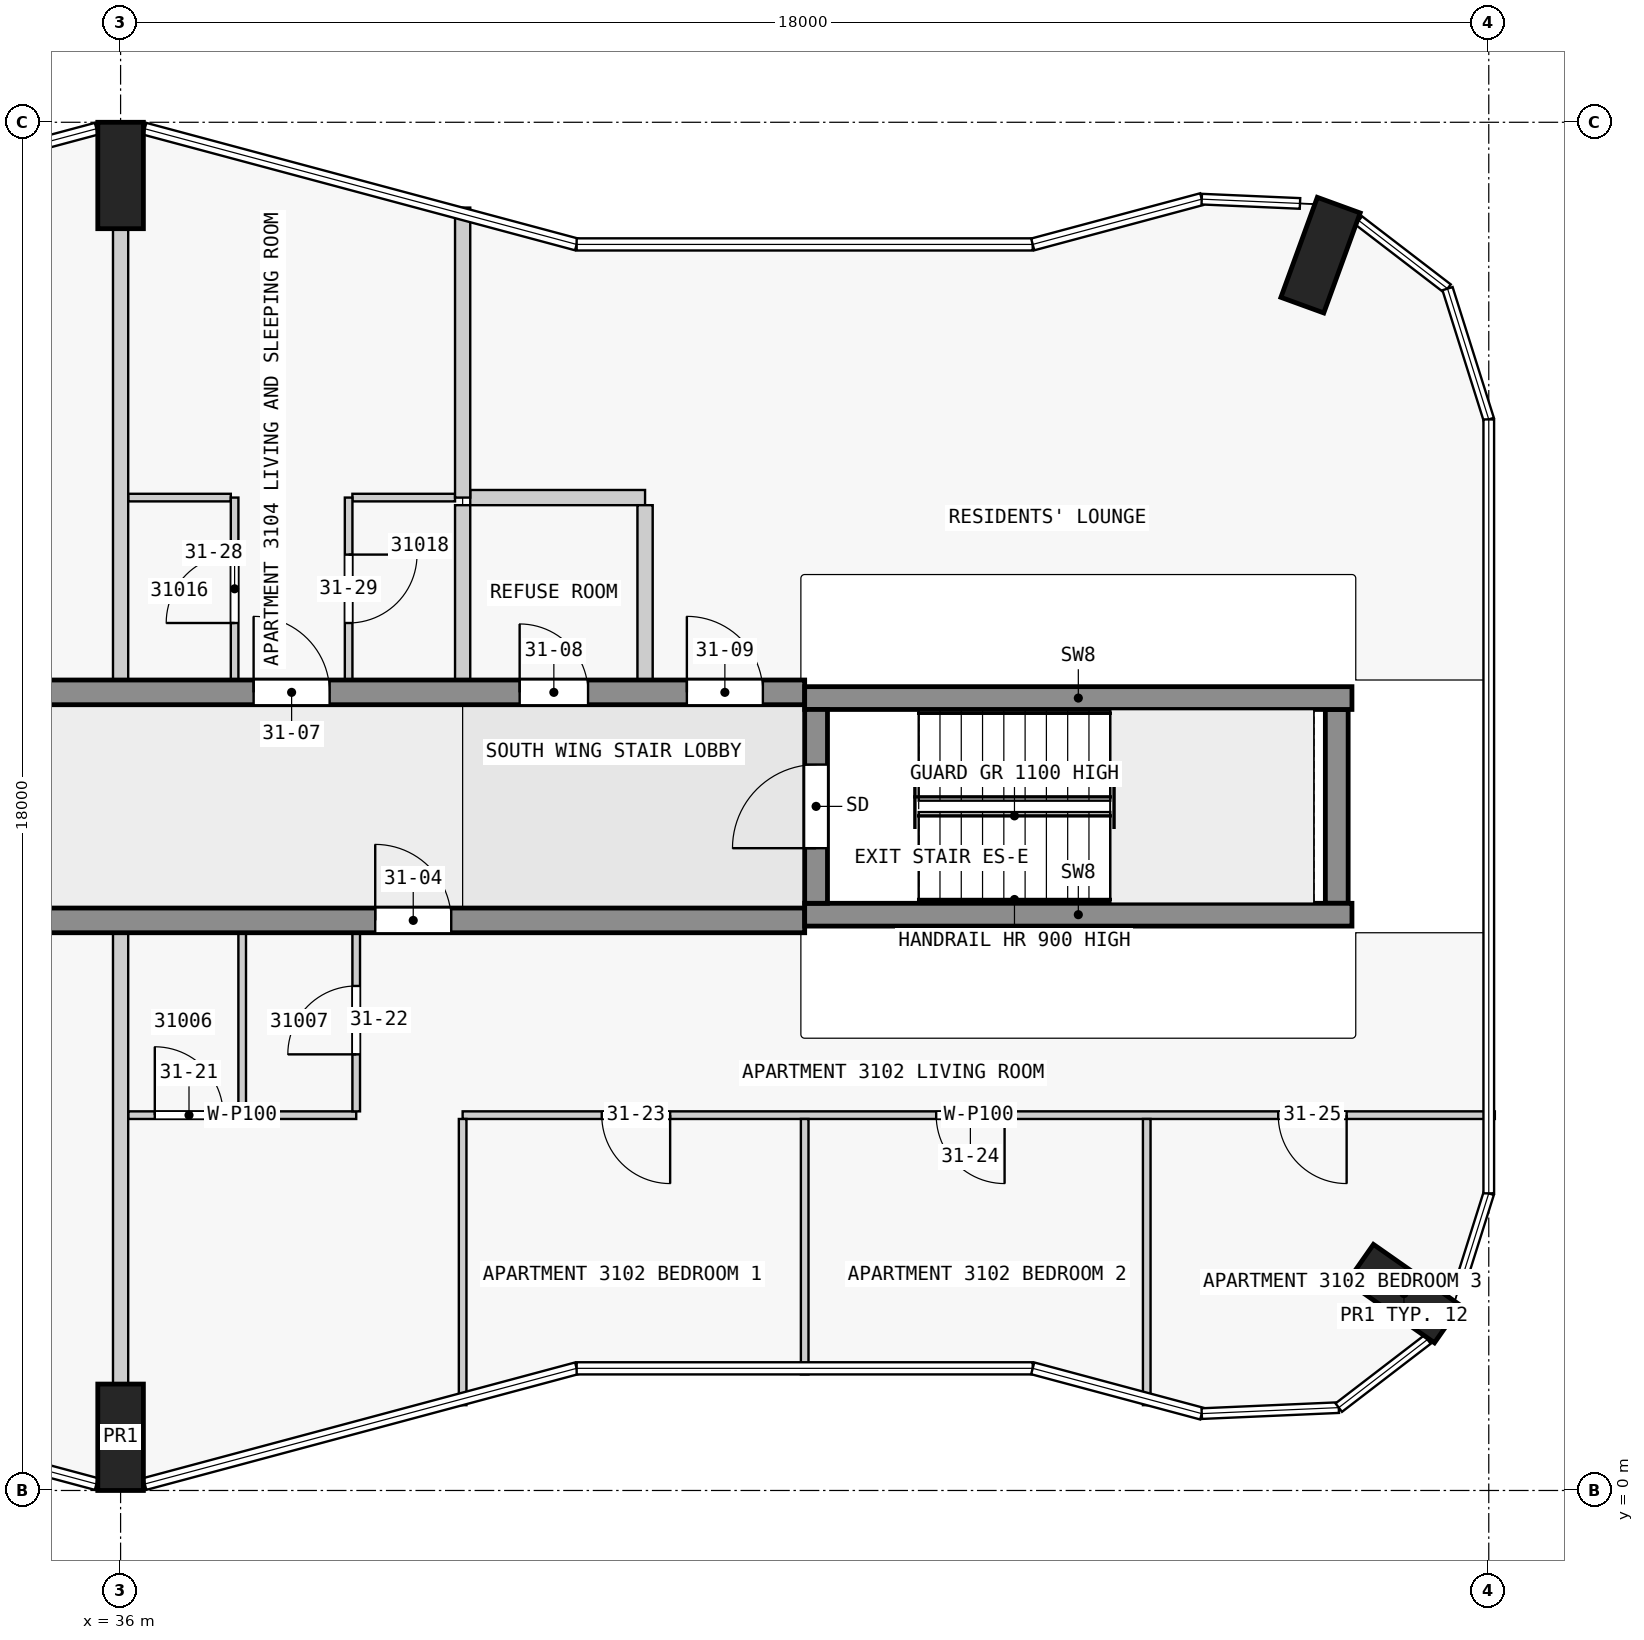
"""IFC4 building model, lengths in metres.
Left out: names, types, materials, properties, quantities, classifications, styles, units other than length and angle.
Written with IfcOpenShell. Run it as: python <this file> out.ifc"""

import sys

from ifc_helpers import new_model, si_unit, direction, frame, frame_2d, origin, origin_2d, place, context, subcontext, project, spatial, rectangle, extrude, element, fill, save


model = new_model("IFC4")
c1 = context("Model", 3, precision=1e-05, world=origin(), true_north=direction((0.0, 1.0)))
c2 = subcontext(c1, "Body", "Model", "MODEL_VIEW")
j1 = project(units=[si_unit("LENGTHUNIT", "METRE"), si_unit("PLANEANGLEUNIT", "RADIAN")], contexts=[c1])
p1 = place(None, origin())
s1 = spatial("IfcSite", under=j1, at=p1, CompositionType="ELEMENT")
p2 = place(p1, origin())
s2 = spatial("IfcBuilding", under=s1, at=p2, CompositionType="ELEMENT")
p3 = place(p2, frame((0.0, 0.0, 120.3)))
s3 = spatial("IfcBuildingStorey", under=s2, at=p3, CompositionType="ELEMENT", Elevation=120.3)
for number, where, z_axis, x_axis in (
    (1, (36.0, 0.7, 0.0), (0.0, 0.0, 1.0), (1.0, 0.0, 0.0)),
    (2, (52.884, 2.59, 0.0), (0.0, 0.0, 1.0), (0.574, 0.819, 0.0)),
    (3, (51.787, 16.252, 0.0), (0.0, 0.0, 1.0), (-0.94, 0.342, 0.0)),
    (4, (36.0, 17.3, 0.0), (0.0, 0.0, 1.0), (1.0, 0.0, 0.0)),
):
    element("IfcColumn", number, at=place(p3, frame(where, z_axis=z_axis, x_axis=x_axis)), inside=s3, PredefinedType="COLUMN", context=c2, shape_type="SweptSolid", body=[
        extrude(rectangle(XDim=0.6, YDim=1.4, at=origin_2d()), origin(), (0.0, 0.0, 1.0), 3.5),
    ])
p4 = place(p3, frame((45.15, 7.725, 0.0), z_axis=(0.0, 0.0, 1.0), x_axis=(0.0, 1.0, 0.0)))
e5 = element("IfcWall", 5, at=p4, inside=s3, PredefinedType="SHEAR", context=c2, shape_type="SweptSolid", body=[
    extrude(rectangle(XDim=2.55, YDim=0.3, at=frame_2d((1.275, 0.0))), origin(), (0.0, 0.0, 1.0), 3.5),
])
p5 = place(p4, frame((0.725, 0.0, 0.0)))
e6 = element("IfcOpeningElement", 6, at=p5, cuts=e5, PredefinedType="OPENING", context=c2, shape_type="SweptSolid", body=[
    extrude(rectangle(XDim=1.1, YDim=2.1, at=frame_2d((0.55, 1.05))), frame((0.0, 0.16, 0.0), z_axis=(0.0, -1.0, 0.0), x_axis=(1.0, 0.0, 0.0)), (0.0, 0.0, 1.0), 0.32),
])
p6 = place(p3, frame((52.0, 7.725, 0.0), z_axis=(0.0, 0.0, 1.0), x_axis=(0.0, 1.0, 0.0)))
e7 = element("IfcWall", 7, at=p6, inside=s3, PredefinedType="SHEAR", context=c2, shape_type="SweptSolid", body=[
    extrude(rectangle(XDim=2.55, YDim=0.3, at=frame_2d((1.275, 0.0))), origin(), (0.0, 0.0, 1.0), 3.5),
])
for number, where, z_axis, x_axis in (
    (8, (45.0, 7.575, 0.0), (0.0, 0.0, 1.0), (1.0, 0.0, 0.0)),
    (9, (45.0, 10.425, 0.0), (0.0, 0.0, 1.0), (1.0, 0.0, 0.0)),
):
    element("IfcWall", number, at=place(p3, frame(where, z_axis=z_axis, x_axis=x_axis)), inside=s3, PredefinedType="SHEAR", context=c2, shape_type="SweptSolid", body=[
        extrude(rectangle(XDim=7.2, YDim=0.3, at=frame_2d((3.6, 0.0))), origin(), (0.0, 0.0, 1.0), 3.5),
    ])
p7 = place(p3, frame((22.5, 7.5, 0.0), z_axis=(0.0, 0.0, 1.0), x_axis=(1.0, 0.0, 0.0)))
e10 = element("IfcWall", 10, at=p7, inside=s3, PredefinedType="SHEAR", context=c2, shape_type="SweptSolid", body=[
    extrude(rectangle(XDim=22.5, YDim=0.325, at=frame_2d((11.25, 0.0))), origin(), (0.0, 0.0, 1.0), 3.2),
])
p8 = place(p7, frame((1.75, 0.0, 0.0)))
e11 = element("IfcOpeningElement", 11, at=p8, cuts=e10, PredefinedType="OPENING", context=c2, shape_type="SweptSolid", body=[
    extrude(rectangle(XDim=1.0, YDim=2.1, at=frame_2d((0.5, 1.05))), frame((0.0, 0.172, 0.0), z_axis=(0.0, -1.0, 0.0), x_axis=(1.0, 0.0, 0.0)), (0.0, 0.0, 1.0), 0.345),
])
p9 = place(p7, frame((6.25, 0.0, 0.0)))
e12 = element("IfcOpeningElement", 12, at=p9, cuts=e10, PredefinedType="OPENING", context=c2, shape_type="SweptSolid", body=[
    extrude(rectangle(XDim=1.0, YDim=2.1, at=frame_2d((0.5, 1.05))), frame((0.0, 0.172, 0.0), z_axis=(0.0, -1.0, 0.0), x_axis=(1.0, 0.0, 0.0)), (0.0, 0.0, 1.0), 0.345),
])
p10 = place(p7, frame((10.75, 0.0, 0.0)))
e13 = element("IfcOpeningElement", 13, at=p10, cuts=e10, PredefinedType="OPENING", context=c2, shape_type="SweptSolid", body=[
    extrude(rectangle(XDim=1.0, YDim=2.1, at=frame_2d((0.5, 1.05))), frame((0.0, 0.172, 0.0), z_axis=(0.0, -1.0, 0.0), x_axis=(1.0, 0.0, 0.0)), (0.0, 0.0, 1.0), 0.345),
])
p11 = place(p7, frame((16.85, 0.0, 0.0)))
e14 = element("IfcOpeningElement", 14, at=p11, cuts=e10, PredefinedType="OPENING", context=c2, shape_type="SweptSolid", body=[
    extrude(rectangle(XDim=1.0, YDim=2.1, at=frame_2d((0.5, 1.05))), frame((0.0, 0.172, 0.0), z_axis=(0.0, -1.0, 0.0), x_axis=(1.0, 0.0, 0.0)), (0.0, 0.0, 1.0), 0.345),
])
p12 = place(p3, frame((22.5, 10.5, 0.0), z_axis=(0.0, 0.0, 1.0), x_axis=(1.0, 0.0, 0.0)))
e15 = element("IfcWall", 15, at=p12, inside=s3, PredefinedType="SHEAR", context=c2, shape_type="SweptSolid", body=[
    extrude(rectangle(XDim=22.5, YDim=0.325, at=frame_2d((11.25, 0.0))), origin(), (0.0, 0.0, 1.0), 3.2),
])
p13 = place(p12, frame((1.75, 0.0, 0.0)))
e16 = element("IfcOpeningElement", 16, at=p13, cuts=e15, PredefinedType="OPENING", context=c2, shape_type="SweptSolid", body=[
    extrude(rectangle(XDim=1.0, YDim=2.1, at=frame_2d((0.5, 1.05))), frame((0.0, 0.172, 0.0), z_axis=(0.0, -1.0, 0.0), x_axis=(1.0, 0.0, 0.0)), (0.0, 0.0, 1.0), 0.345),
])
p14 = place(p12, frame((8.55, 0.0, 0.0)))
e17 = element("IfcOpeningElement", 17, at=p14, cuts=e15, PredefinedType="OPENING", context=c2, shape_type="SweptSolid", body=[
    extrude(rectangle(XDim=1.0, YDim=2.1, at=frame_2d((0.5, 1.05))), frame((0.0, 0.172, 0.0), z_axis=(0.0, -1.0, 0.0), x_axis=(1.0, 0.0, 0.0)), (0.0, 0.0, 1.0), 0.345),
])
p15 = place(p12, frame((15.25, 0.0, 0.0)))
e18 = element("IfcOpeningElement", 18, at=p15, cuts=e15, PredefinedType="OPENING", context=c2, shape_type="SweptSolid", body=[
    extrude(rectangle(XDim=1.0, YDim=2.1, at=frame_2d((0.5, 1.05))), frame((0.0, 0.172, 0.0), z_axis=(0.0, -1.0, 0.0), x_axis=(1.0, 0.0, 0.0)), (0.0, 0.0, 1.0), 0.345),
])
p16 = place(p12, frame((18.75, 0.0, 0.0)))
e19 = element("IfcOpeningElement", 19, at=p16, cuts=e15, PredefinedType="OPENING", context=c2, shape_type="SweptSolid", body=[
    extrude(rectangle(XDim=0.9, YDim=2.1, at=frame_2d((0.45, 1.05))), frame((0.0, 0.172, 0.0), z_axis=(0.0, -1.0, 0.0), x_axis=(1.0, 0.0, 0.0)), (0.0, 0.0, 1.0), 0.345),
])
p17 = place(p12, frame((20.95, 0.0, 0.0)))
e20 = element("IfcOpeningElement", 20, at=p17, cuts=e15, PredefinedType="OPENING", context=c2, shape_type="SweptSolid", body=[
    extrude(rectangle(XDim=1.0, YDim=2.1, at=frame_2d((0.5, 1.05))), frame((0.0, 0.172, 0.0), z_axis=(0.0, -1.0, 0.0), x_axis=(1.0, 0.0, 0.0)), (0.0, 0.0, 1.0), 0.345),
])
p18 = place(p3, frame((54.08, 4.938, 0.0), z_axis=(0.0, 0.0, 1.0), x_axis=(-1.0, 0.0, 0.0)))
e21 = element("IfcWall", 21, at=p18, inside=s3, PredefinedType="PARTITIONING", context=c2, shape_type="SweptSolid", body=[
    extrude(rectangle(XDim=13.58, YDim=0.1, at=frame_2d((6.79, 0.0))), origin(), (0.0, 0.0, 1.0), 3.2),
])
p19 = place(p18, frame((10.85, 0.0, 0.0)))
e22 = element("IfcOpeningElement", 22, at=p19, cuts=e21, PredefinedType="OPENING", context=c2, shape_type="SweptSolid", body=[
    extrude(rectangle(XDim=0.9, YDim=2.1, at=frame_2d((0.45, 1.05))), frame((0.0, 0.06, 0.0), z_axis=(0.0, -1.0, 0.0), x_axis=(1.0, 0.0, 0.0)), (0.0, 0.0, 1.0), 0.12),
])
p20 = place(p18, frame((6.45, 0.0, 0.0)))
e23 = element("IfcOpeningElement", 23, at=p20, cuts=e21, PredefinedType="OPENING", context=c2, shape_type="SweptSolid", body=[
    extrude(rectangle(XDim=0.9, YDim=2.1, at=frame_2d((0.45, 1.05))), frame((0.0, 0.06, 0.0), z_axis=(0.0, -1.0, 0.0), x_axis=(1.0, 0.0, 0.0)), (0.0, 0.0, 1.0), 0.12),
])
p21 = place(p18, frame((1.95, 0.0, 0.0)))
e24 = element("IfcOpeningElement", 24, at=p21, cuts=e21, PredefinedType="OPENING", context=c2, shape_type="SweptSolid", body=[
    extrude(rectangle(XDim=0.9, YDim=2.1, at=frame_2d((0.45, 1.05))), frame((0.0, 0.06, 0.0), z_axis=(0.0, -1.0, 0.0), x_axis=(1.0, 0.0, 0.0)), (0.0, 0.0, 1.0), 0.12),
])
p22 = place(p3, frame((36.1, 4.938, 0.0), z_axis=(0.0, 0.0, 1.0), x_axis=(1.0, 0.0, 0.0)))
e25 = element("IfcWall", 25, at=p22, inside=s3, PredefinedType="PARTITIONING", context=c2, shape_type="SweptSolid", body=[
    extrude(rectangle(XDim=3.0, YDim=0.1, at=frame_2d((1.5, 0.0))), origin(), (0.0, 0.0, 1.0), 3.2),
])
p23 = place(p22, frame((0.35, 0.0, 0.0)))
e26 = element("IfcOpeningElement", 26, at=p23, cuts=e25, PredefinedType="OPENING", context=c2, shape_type="SweptSolid", body=[
    extrude(rectangle(XDim=0.9, YDim=2.1, at=frame_2d((0.45, 1.05))), frame((0.0, 0.06, 0.0), z_axis=(0.0, -1.0, 0.0), x_axis=(1.0, 0.0, 0.0)), (0.0, 0.0, 1.0), 0.12),
])
for number, where, z_axis, x_axis in (
    (27, (37.45, 13.062, 0.0), (0.0, 0.0, 1.0), (-1.0, 0.0, 0.0)),
    (28, (40.4, 13.062, 0.0), (0.0, 0.0, 1.0), (-1.0, 0.0, 0.0)),
):
    element("IfcWall", number, at=place(p3, frame(where, z_axis=z_axis, x_axis=x_axis)), inside=s3, PredefinedType="PARTITIONING", context=c2, shape_type="SweptSolid", body=[
        extrude(rectangle(XDim=1.35, YDim=0.1, at=frame_2d((0.675, 0.0))), origin(), (0.0, 0.0, 1.0), 3.2),
    ])
p24 = place(p3, frame((42.9, 13.062, 0.0), z_axis=(0.0, 0.0, 1.0), x_axis=(-1.0, 0.0, 0.0)))
e29 = element("IfcWall", 29, at=p24, inside=s3, PredefinedType="PARTITIONING", context=c2, shape_type="SweptSolid", body=[
    extrude(rectangle(XDim=2.3, YDim=0.2, at=frame_2d((1.15, 0.0))), origin(), (0.0, 0.0, 1.0), 3.2),
])
for number, where, z_axis, x_axis in (
    (30, (36.0, 1.4, 0.0), (0.0, 0.0, 1.0), (0.0, 1.0, 0.0)),
    (31, (36.0, 10.663, 0.0), (0.0, 0.0, 1.0), (0.0, 1.0, 0.0)),
):
    element("IfcWall", number, at=place(p3, frame(where, z_axis=z_axis, x_axis=x_axis)), inside=s3, PredefinedType="PARTITIONING", context=c2, shape_type="SweptSolid", body=[
        extrude(rectangle(XDim=5.938, YDim=0.2, at=frame_2d((2.969, 0.0))), origin(), (0.0, 0.0, 1.0), 3.2),
    ])
p25 = place(p3, frame((37.5, 10.663, 0.0), z_axis=(0.0, 0.0, 1.0), x_axis=(0.0, 1.0, 0.0)))
e32 = element("IfcWall", 32, at=p25, inside=s3, PredefinedType="PARTITIONING", context=c2, shape_type="SweptSolid", body=[
    extrude(rectangle(XDim=2.4, YDim=0.1, at=frame_2d((1.2, 0.0))), origin(), (0.0, 0.0, 1.0), 3.2),
])
p26 = place(p25, frame((0.75, 0.0, 0.0)))
e33 = element("IfcOpeningElement", 33, at=p26, cuts=e32, PredefinedType="OPENING", context=c2, shape_type="SweptSolid", body=[
    extrude(rectangle(XDim=0.9, YDim=2.1, at=frame_2d((0.45, 1.05))), frame((0.0, 0.06, 0.0), z_axis=(0.0, -1.0, 0.0), x_axis=(1.0, 0.0, 0.0)), (0.0, 0.0, 1.0), 0.12),
])
p27 = place(p3, frame((37.6, 4.988, 0.0), z_axis=(0.0, 0.0, 1.0), x_axis=(0.0, 1.0, 0.0)))
e34 = element("IfcWall", 34, at=p27, inside=s3, PredefinedType="PARTITIONING", context=c2, shape_type="SweptSolid", body=[
    extrude(rectangle(XDim=2.35, YDim=0.1, at=frame_2d((1.175, 0.0))), origin(), (0.0, 0.0, 1.0), 3.2),
])
p28 = place(p3, frame((39.0, 13.062, 0.0), z_axis=(0.0, 0.0, 1.0), x_axis=(0.0, -1.0, 0.0)))
e35 = element("IfcWall", 35, at=p28, inside=s3, PredefinedType="PARTITIONING", context=c2, shape_type="SweptSolid", body=[
    extrude(rectangle(XDim=2.4, YDim=0.1, at=frame_2d((1.2, 0.0))), origin(), (0.0, 0.0, 1.0), 3.2),
])
p29 = place(p28, frame((0.75, 0.0, 0.0)))
e36 = element("IfcOpeningElement", 36, at=p29, cuts=e35, PredefinedType="OPENING", context=c2, shape_type="SweptSolid", body=[
    extrude(rectangle(XDim=0.9, YDim=2.1, at=frame_2d((0.45, 1.05))), frame((0.0, 0.06, 0.0), z_axis=(0.0, -1.0, 0.0), x_axis=(1.0, 0.0, 0.0)), (0.0, 0.0, 1.0), 0.12),
])
p30 = place(p3, frame((39.1, 4.988, 0.0), z_axis=(0.0, 0.0, 1.0), x_axis=(0.0, 1.0, 0.0)))
e37 = element("IfcWall", 37, at=p30, inside=s3, PredefinedType="PARTITIONING", context=c2, shape_type="SweptSolid", body=[
    extrude(rectangle(XDim=2.35, YDim=0.1, at=frame_2d((1.175, 0.0))), origin(), (0.0, 0.0, 1.0), 3.2),
])
p31 = place(p30, frame((0.75, 0.0, 0.0)))
e38 = element("IfcOpeningElement", 38, at=p31, cuts=e37, PredefinedType="OPENING", context=c2, shape_type="SweptSolid", body=[
    extrude(rectangle(XDim=0.9, YDim=2.1, at=frame_2d((0.45, 1.05))), frame((0.0, 0.06, 0.0), z_axis=(0.0, -1.0, 0.0), x_axis=(1.0, 0.0, 0.0)), (0.0, 0.0, 1.0), 0.12),
])
p32 = place(p3, frame((40.5, 4.887, 0.0), z_axis=(0.0, 0.0, 1.0), x_axis=(0.0, -1.0, 0.0)))
e39 = element("IfcWall", 39, at=p32, inside=s3, PredefinedType="PARTITIONING", context=c2, shape_type="SweptSolid", body=[
    extrude(rectangle(XDim=3.765, YDim=0.1, at=frame_2d((1.883, 0.0))), origin(), (0.0, 0.0, 1.0), 3.2),
])
p33 = place(p3, frame((40.5, 16.878, 0.0), z_axis=(0.0, 0.0, 1.0), x_axis=(0.0, -1.0, 0.0)))
e40 = element("IfcWall", 40, at=p33, inside=s3, PredefinedType="PARTITIONING", context=c2, shape_type="SweptSolid", body=[
    extrude(rectangle(XDim=3.815, YDim=0.2, at=frame_2d((1.908, 0.0))), origin(), (0.0, 0.0, 1.0), 3.2),
])
for number, where, z_axis, x_axis in (
    (41, (40.5, 10.663, 0.0), (0.0, 0.0, 1.0), (0.0, 1.0, 0.0)),
    (42, (42.9, 10.663, 0.0), (0.0, 0.0, 1.0), (0.0, 1.0, 0.0)),
):
    element("IfcWall", number, at=place(p3, frame(where, z_axis=z_axis, x_axis=x_axis)), inside=s3, PredefinedType="PARTITIONING", context=c2, shape_type="SweptSolid", body=[
        extrude(rectangle(XDim=2.3, YDim=0.2, at=frame_2d((1.15, 0.0))), origin(), (0.0, 0.0, 1.0), 3.2),
    ])
p34 = place(p3, frame((45.0, 1.527, 0.0), z_axis=(0.0, 0.0, 1.0), x_axis=(0.0, 1.0, 0.0)))
e43 = element("IfcWall", 43, at=p34, inside=s3, PredefinedType="PARTITIONING", context=c2, shape_type="SweptSolid", body=[
    extrude(rectangle(XDim=3.361, YDim=0.1, at=frame_2d((1.68, 0.0))), origin(), (0.0, 0.0, 1.0), 3.2),
])
p35 = place(p3, frame((49.5, 1.122, 0.0), z_axis=(0.0, 0.0, 1.0), x_axis=(0.0, 1.0, 0.0)))
e44 = element("IfcWall", 44, at=p35, inside=s3, PredefinedType="PARTITIONING", context=c2, shape_type="SweptSolid", body=[
    extrude(rectangle(XDim=3.765, YDim=0.1, at=frame_2d((1.883, 0.0))), origin(), (0.0, 0.0, 1.0), 3.2),
])
p36 = place(p5, origin())
e45 = element("IfcDoor", 45, at=p36, inside=s3, OperationType="SINGLE_SWING_LEFT", PredefinedType="DOOR", context=c2, shape_type="SweptSolid", body=[
    extrude(rectangle(XDim=1.1, YDim=2.1, at=frame_2d((0.55, 1.05))), frame((0.0, 0.025, 0.0), z_axis=(0.0, -1.0, 0.0), x_axis=(1.0, 0.0, 0.0)), (0.0, 0.0, 1.0), 0.05),
])
fill(e6, e45)
p37 = place(p11, origin())
e46 = element("IfcDoor", 46, at=p37, inside=s3, OperationType="SINGLE_SWING_RIGHT", PredefinedType="DOOR", context=c2, shape_type="SweptSolid", body=[
    extrude(rectangle(XDim=1.0, YDim=2.1, at=frame_2d((0.5, 1.05))), frame((0.0, 0.025, 0.0), z_axis=(0.0, -1.0, 0.0), x_axis=(1.0, 0.0, 0.0)), (0.0, 0.0, 1.0), 0.05),
])
fill(e14, e46)
p38 = place(p15, origin())
e47 = element("IfcDoor", 47, at=p38, inside=s3, OperationType="SINGLE_SWING_RIGHT", PredefinedType="DOOR", context=c2, shape_type="SweptSolid", body=[
    extrude(rectangle(XDim=1.0, YDim=2.1, at=frame_2d((0.5, 1.05))), frame((0.0, 0.025, 0.0), z_axis=(0.0, -1.0, 0.0), x_axis=(1.0, 0.0, 0.0)), (0.0, 0.0, 1.0), 0.05),
])
fill(e18, e47)
p39 = place(p16, origin())
e48 = element("IfcDoor", 48, at=p39, inside=s3, OperationType="SINGLE_SWING_RIGHT", PredefinedType="DOOR", context=c2, shape_type="SweptSolid", body=[
    extrude(rectangle(XDim=0.9, YDim=2.1, at=frame_2d((0.45, 1.05))), frame((0.0, 0.025, 0.0), z_axis=(0.0, -1.0, 0.0), x_axis=(1.0, 0.0, 0.0)), (0.0, 0.0, 1.0), 0.05),
])
fill(e19, e48)
p40 = place(p17, origin())
e49 = element("IfcDoor", 49, at=p40, inside=s3, OperationType="SINGLE_SWING_RIGHT", PredefinedType="DOOR", context=c2, shape_type="SweptSolid", body=[
    extrude(rectangle(XDim=1.0, YDim=2.1, at=frame_2d((0.5, 1.05))), frame((0.0, 0.025, 0.0), z_axis=(0.0, -1.0, 0.0), x_axis=(1.0, 0.0, 0.0)), (0.0, 0.0, 1.0), 0.05),
])
fill(e20, e49)
p41 = place(p23, origin())
e50 = element("IfcDoor", 50, at=p41, inside=s3, OperationType="SINGLE_SWING_LEFT", PredefinedType="DOOR", context=c2, shape_type="SweptSolid", body=[
    extrude(rectangle(XDim=0.9, YDim=2.1, at=frame_2d((0.45, 1.05))), frame((0.0, 0.025, 0.0), z_axis=(0.0, -1.0, 0.0), x_axis=(1.0, 0.0, 0.0)), (0.0, 0.0, 1.0), 0.05),
])
fill(e26, e50)
p42 = place(p31, origin())
e51 = element("IfcDoor", 51, at=p42, inside=s3, OperationType="SINGLE_SWING_RIGHT", PredefinedType="DOOR", context=c2, shape_type="SweptSolid", body=[
    extrude(rectangle(XDim=0.9, YDim=2.1, at=frame_2d((0.45, 1.05))), frame((0.0, 0.025, 0.0), z_axis=(0.0, -1.0, 0.0), x_axis=(1.0, 0.0, 0.0)), (0.0, 0.0, 1.0), 0.05),
])
fill(e38, e51)
p43 = place(p19, origin())
e52 = element("IfcDoor", 52, at=p43, inside=s3, OperationType="SINGLE_SWING_RIGHT", PredefinedType="DOOR", context=c2, shape_type="SweptSolid", body=[
    extrude(rectangle(XDim=0.9, YDim=2.1, at=frame_2d((0.45, 1.05))), frame((0.0, 0.025, 0.0), z_axis=(0.0, -1.0, 0.0), x_axis=(1.0, 0.0, 0.0)), (0.0, 0.0, 1.0), 0.05),
])
fill(e22, e52)
p44 = place(p20, origin())
e53 = element("IfcDoor", 53, at=p44, inside=s3, OperationType="SINGLE_SWING_RIGHT", PredefinedType="DOOR", context=c2, shape_type="SweptSolid", body=[
    extrude(rectangle(XDim=0.9, YDim=2.1, at=frame_2d((0.45, 1.05))), frame((0.0, 0.025, 0.0), z_axis=(0.0, -1.0, 0.0), x_axis=(1.0, 0.0, 0.0)), (0.0, 0.0, 1.0), 0.05),
])
fill(e23, e53)
p45 = place(p21, origin())
e54 = element("IfcDoor", 54, at=p45, inside=s3, OperationType="SINGLE_SWING_LEFT", PredefinedType="DOOR", context=c2, shape_type="SweptSolid", body=[
    extrude(rectangle(XDim=0.9, YDim=2.1, at=frame_2d((0.45, 1.05))), frame((0.0, 0.025, 0.0), z_axis=(0.0, -1.0, 0.0), x_axis=(1.0, 0.0, 0.0)), (0.0, 0.0, 1.0), 0.05),
])
fill(e24, e54)
p46 = place(p26, origin())
e55 = element("IfcDoor", 55, at=p46, inside=s3, OperationType="SINGLE_SWING_LEFT", PredefinedType="DOOR", context=c2, shape_type="SweptSolid", body=[
    extrude(rectangle(XDim=0.9, YDim=2.1, at=frame_2d((0.45, 1.05))), frame((0.0, 0.025, 0.0), z_axis=(0.0, -1.0, 0.0), x_axis=(1.0, 0.0, 0.0)), (0.0, 0.0, 1.0), 0.05),
])
fill(e33, e55)
p47 = place(p29, origin())
e56 = element("IfcDoor", 56, at=p47, inside=s3, OperationType="SINGLE_SWING_LEFT", PredefinedType="DOOR", context=c2, shape_type="SweptSolid", body=[
    extrude(rectangle(XDim=0.9, YDim=2.1, at=frame_2d((0.45, 1.05))), frame((0.0, 0.025, 0.0), z_axis=(0.0, -1.0, 0.0), x_axis=(1.0, 0.0, 0.0)), (0.0, 0.0, 1.0), 0.05),
])
fill(e36, e56)
save(model, sys.argv[1])
